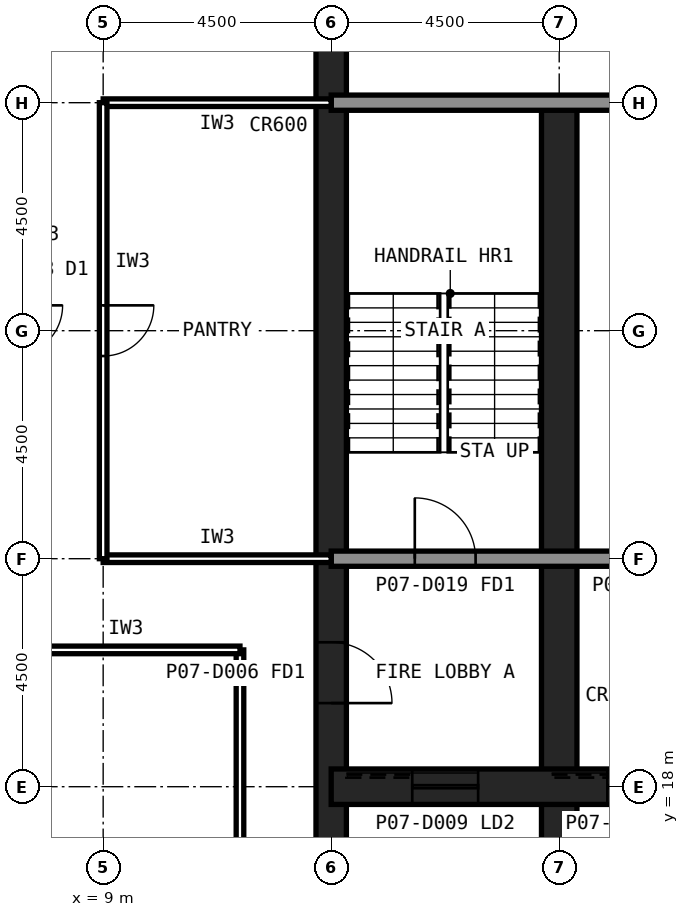
"""IFC4 building model, lengths in metres.
Left out: names, types, materials, properties, quantities, classifications, styles, units other than length and angle.
Written with IfcOpenShell. Run it as: python <this file> out.ifc"""

import sys

from ifc_helpers import new_model, si_unit, direction, frame, frame_2d, origin, place, context, subcontext, project, spatial, rectangle, extrude, element, fill, save


model = new_model("IFC4")
c1 = context("Model", 3, precision=1e-05, world=origin(), true_north=direction((0.0, 1.0)))
c2 = subcontext(c1, "Body", "Model", "MODEL_VIEW")
j1 = project(units=[si_unit("LENGTHUNIT", "METRE"), si_unit("PLANEANGLEUNIT", "RADIAN")], contexts=[c1])
p1 = place(None, origin())
s1 = spatial("IfcSite", under=j1, at=p1, CompositionType="ELEMENT")
p2 = place(p1, origin())
s2 = spatial("IfcBuilding", under=s1, at=p2, CompositionType="ELEMENT")
p3 = place(p2, frame((0.0, 0.0, 33.2)))
s3 = spatial("IfcBuildingStorey", under=s2, at=p3, CompositionType="ELEMENT", Elevation=33.2)
p4 = place(p3, frame((13.5, 40.5, 0.0), z_axis=(0.0, 0.0, 1.0), x_axis=(0.0, -1.0, 0.0)))
e1 = element("IfcWall", 1, at=p4, inside=s3, PredefinedType="SHEAR", context=c2, shape_type="SweptSolid", body=[
    extrude(rectangle(XDim=27.0, YDim=0.6, at=frame_2d((13.5, 0.0))), origin(), (0.0, 0.0, 1.0), 4.2),
])
p5 = place(p4, frame((19.65, 0.0, 0.0)))
e2 = element("IfcOpeningElement", 2, at=p5, cuts=e1, PredefinedType="OPENING", context=c2, shape_type="SweptSolid", body=[
    extrude(rectangle(XDim=1.2, YDim=2.1, at=frame_2d((0.6, 1.05))), frame((0.0, 0.31, 0.0), z_axis=(0.0, -1.0, 0.0), x_axis=(1.0, 0.0, 0.0)), (0.0, 0.0, 1.0), 0.62),
])
p6 = place(p4, frame((5.85, 0.0, 0.0)))
e3 = element("IfcOpeningElement", 3, at=p6, cuts=e1, PredefinedType="OPENING", context=c2, shape_type="SweptSolid", body=[
    extrude(rectangle(XDim=1.8, YDim=2.1, at=frame_2d((0.9, 1.05))), frame((0.0, 0.31, 0.0), z_axis=(0.0, -1.0, 0.0), x_axis=(1.0, 0.0, 0.0)), (0.0, 0.0, 1.0), 0.62),
])
p7 = place(p3, frame((18.0, 13.5, 0.0), z_axis=(0.0, 0.0, 1.0), x_axis=(0.0, 1.0, 0.0)))
e4 = element("IfcWall", 4, at=p7, inside=s3, PredefinedType="SHEAR", context=c2, shape_type="SweptSolid", body=[
    extrude(rectangle(XDim=18.0, YDim=0.7, at=frame_2d((9.0, 0.0))), origin(), (0.0, 0.0, 1.0), 4.2),
])
p8 = place(p3, frame((13.5, 18.0, 0.0), z_axis=(0.0, 0.0, 1.0), x_axis=(1.0, 0.0, 0.0)))
e5 = element("IfcWall", 5, at=p8, inside=s3, PredefinedType="SHEAR", context=c2, shape_type="SweptSolid", body=[
    extrude(rectangle(XDim=27.0, YDim=0.7, at=frame_2d((13.5, 0.0))), origin(), (0.0, 0.0, 1.0), 4.2),
])
p9 = place(p8, frame((24.3, 0.0, 0.0)))
e6 = element("IfcOpeningElement", 6, at=p9, cuts=e5, PredefinedType="OPENING", context=c2, shape_type="SweptSolid", body=[
    extrude(rectangle(XDim=0.9, YDim=2.1, at=frame_2d((0.45, 1.05))), frame((0.0, 0.36, 0.0), z_axis=(0.0, -1.0, 0.0), x_axis=(1.0, 0.0, 0.0)), (0.0, 0.0, 1.0), 0.72),
])
p10 = place(p8, frame((5.45, 0.0, 0.0)))
e7 = element("IfcOpeningElement", 7, at=p10, cuts=e5, PredefinedType="OPENING", context=c2, shape_type="SweptSolid", body=[
    extrude(rectangle(XDim=1.1, YDim=2.1, at=frame_2d((0.55, 1.05))), frame((0.0, 0.36, 0.0), z_axis=(0.0, -1.0, 0.0), x_axis=(1.0, 0.0, 0.0)), (0.0, 0.0, 1.0), 0.72),
])
p11 = place(p8, frame((8.45, 0.0, 0.0)))
e8 = element("IfcOpeningElement", 8, at=p11, cuts=e5, PredefinedType="OPENING", context=c2, shape_type="SweptSolid", body=[
    extrude(rectangle(XDim=1.1, YDim=2.1, at=frame_2d((0.55, 1.05))), frame((0.0, 0.36, 0.0), z_axis=(0.0, -1.0, 0.0), x_axis=(1.0, 0.0, 0.0)), (0.0, 0.0, 1.0), 0.72),
])
p12 = place(p8, frame((11.45, 0.0, 0.0)))
e9 = element("IfcOpeningElement", 9, at=p12, cuts=e5, PredefinedType="OPENING", context=c2, shape_type="SweptSolid", body=[
    extrude(rectangle(XDim=1.1, YDim=2.1, at=frame_2d((0.55, 1.05))), frame((0.0, 0.36, 0.0), z_axis=(0.0, -1.0, 0.0), x_axis=(1.0, 0.0, 0.0)), (0.0, 0.0, 1.0), 0.72),
])
p13 = place(p8, frame((14.45, 0.0, 0.0)))
e10 = element("IfcOpeningElement", 10, at=p13, cuts=e5, PredefinedType="OPENING", context=c2, shape_type="SweptSolid", body=[
    extrude(rectangle(XDim=1.1, YDim=2.1, at=frame_2d((0.55, 1.05))), frame((0.0, 0.36, 0.0), z_axis=(0.0, -1.0, 0.0), x_axis=(1.0, 0.0, 0.0)), (0.0, 0.0, 1.0), 0.72),
])
p14 = place(p8, frame((17.45, 0.0, 0.0)))
e11 = element("IfcOpeningElement", 11, at=p14, cuts=e5, PredefinedType="OPENING", context=c2, shape_type="SweptSolid", body=[
    extrude(rectangle(XDim=1.1, YDim=2.1, at=frame_2d((0.55, 1.05))), frame((0.0, 0.36, 0.0), z_axis=(0.0, -1.0, 0.0), x_axis=(1.0, 0.0, 0.0)), (0.0, 0.0, 1.0), 0.72),
])
p15 = place(p8, frame((20.45, 0.0, 0.0)))
e12 = element("IfcOpeningElement", 12, at=p15, cuts=e5, PredefinedType="OPENING", context=c2, shape_type="SweptSolid", body=[
    extrude(rectangle(XDim=1.1, YDim=2.1, at=frame_2d((0.55, 1.05))), frame((0.0, 0.36, 0.0), z_axis=(0.0, -1.0, 0.0), x_axis=(1.0, 0.0, 0.0)), (0.0, 0.0, 1.0), 0.72),
])
p16 = place(p8, frame((1.6, 0.0, 0.0)))
e13 = element("IfcOpeningElement", 13, at=p16, cuts=e5, PredefinedType="OPENING", context=c2, shape_type="SweptSolid", body=[
    extrude(rectangle(XDim=1.3, YDim=2.2, at=frame_2d((0.65, 1.1))), frame((0.0, 0.36, 0.0), z_axis=(0.0, -1.0, 0.0), x_axis=(1.0, 0.0, 0.0)), (0.0, 0.0, 1.0), 0.72),
])
p17 = place(p3, frame((13.5, 22.5, 0.0), z_axis=(0.0, 0.0, 1.0), x_axis=(1.0, 0.0, 0.0)))
e14 = element("IfcWall", 14, at=p17, inside=s3, PredefinedType="SOLIDWALL", context=c2, shape_type="SweptSolid", body=[
    extrude(rectangle(XDim=27.0, YDim=0.3, at=frame_2d((13.5, 0.0))), origin(), (0.0, 0.0, 1.0), 4.04),
])
p18 = place(p17, frame((1.65, 0.0, 0.0)))
e15 = element("IfcOpeningElement", 15, at=p18, cuts=e14, PredefinedType="OPENING", context=c2, shape_type="SweptSolid", body=[
    extrude(rectangle(XDim=1.2, YDim=2.1, at=frame_2d((0.6, 1.05))), frame((0.0, 0.16, 0.0), z_axis=(0.0, -1.0, 0.0), x_axis=(1.0, 0.0, 0.0)), (0.0, 0.0, 1.0), 0.32),
])
p19 = place(p17, frame((6.025, 0.0, 0.0)))
e16 = element("IfcOpeningElement", 16, at=p19, cuts=e14, PredefinedType="OPENING", context=c2, shape_type="SweptSolid", body=[
    extrude(rectangle(XDim=1.0, YDim=2.1, at=frame_2d((0.5, 1.05))), frame((0.0, 0.16, 0.0), z_axis=(0.0, -1.0, 0.0), x_axis=(1.0, 0.0, 0.0)), (0.0, 0.0, 1.0), 0.32),
])
p20 = place(p17, frame((10.525, 0.0, 0.0)))
e17 = element("IfcOpeningElement", 17, at=p20, cuts=e14, PredefinedType="OPENING", context=c2, shape_type="SweptSolid", body=[
    extrude(rectangle(XDim=1.0, YDim=2.1, at=frame_2d((0.5, 1.05))), frame((0.0, 0.16, 0.0), z_axis=(0.0, -1.0, 0.0), x_axis=(1.0, 0.0, 0.0)), (0.0, 0.0, 1.0), 0.32),
])
p21 = place(p17, frame((19.75, 0.0, 0.0)))
e18 = element("IfcOpeningElement", 18, at=p21, cuts=e14, PredefinedType="OPENING", context=c2, shape_type="SweptSolid", body=[
    extrude(rectangle(XDim=1.0, YDim=2.1, at=frame_2d((0.5, 1.05))), frame((0.0, 0.16, 0.0), z_axis=(0.0, -1.0, 0.0), x_axis=(1.0, 0.0, 0.0)), (0.0, 0.0, 1.0), 0.32),
])
p22 = place(p17, frame((15.05, 0.0, 0.0)))
e19 = element("IfcOpeningElement", 19, at=p22, cuts=e14, PredefinedType="OPENING", context=c2, shape_type="SweptSolid", body=[
    extrude(rectangle(XDim=1.4, YDim=2.4, at=frame_2d((0.7, 1.2))), frame((0.0, 0.16, 0.0), z_axis=(0.0, -1.0, 0.0), x_axis=(1.0, 0.0, 0.0)), (0.0, 0.0, 1.0), 0.32),
])
p23 = place(p3, frame((13.5, 31.5, 0.0), z_axis=(0.0, 0.0, 1.0), x_axis=(1.0, 0.0, 0.0)))
e20 = element("IfcWall", 20, at=p23, inside=s3, PredefinedType="SOLIDWALL", context=c2, shape_type="SweptSolid", body=[
    extrude(rectangle(XDim=27.0, YDim=0.3, at=frame_2d((13.5, 0.0))), origin(), (0.0, 0.0, 1.0), 4.04),
])
p24 = place(p23, frame((24.15, 0.0, 0.0)))
e21 = element("IfcOpeningElement", 21, at=p24, cuts=e20, PredefinedType="OPENING", context=c2, shape_type="SweptSolid", body=[
    extrude(rectangle(XDim=1.2, YDim=2.1, at=frame_2d((0.6, 1.05))), frame((0.0, 0.16, 0.0), z_axis=(0.0, -1.0, 0.0), x_axis=(1.0, 0.0, 0.0)), (0.0, 0.0, 1.0), 0.32),
])
p25 = place(p23, frame((15.3, 0.0, 0.0)))
e22 = element("IfcOpeningElement", 22, at=p25, cuts=e20, PredefinedType="OPENING", context=c2, shape_type="SweptSolid", body=[
    extrude(rectangle(XDim=0.9, YDim=2.1, at=frame_2d((0.45, 1.05))), frame((0.0, 0.16, 0.0), z_axis=(0.0, -1.0, 0.0), x_axis=(1.0, 0.0, 0.0)), (0.0, 0.0, 1.0), 0.32),
])
p26 = place(p23, frame((19.8, 0.0, 0.0)))
e23 = element("IfcOpeningElement", 23, at=p26, cuts=e20, PredefinedType="OPENING", context=c2, shape_type="SweptSolid", body=[
    extrude(rectangle(XDim=0.9, YDim=2.1, at=frame_2d((0.45, 1.05))), frame((0.0, 0.16, 0.0), z_axis=(0.0, -1.0, 0.0), x_axis=(1.0, 0.0, 0.0)), (0.0, 0.0, 1.0), 0.32),
])
p27 = place(p3, frame((11.7, 20.7, 0.0), z_axis=(0.0, 0.0, 1.0), x_axis=(0.0, -1.0, 0.0)))
e24 = element("IfcWall", 24, at=p27, inside=s3, PredefinedType="PARTITIONING", context=c2, shape_type="SweptSolid", body=[
    extrude(rectangle(XDim=9.0, YDim=0.15, at=frame_2d((4.5, 0.0))), origin(), (0.0, 0.0, 1.0), 4.04),
])
p28 = place(p3, frame((7.2, 20.7, 0.0), z_axis=(0.0, 0.0, 1.0), x_axis=(1.0, 0.0, 0.0)))
e25 = element("IfcWall", 25, at=p28, inside=s3, PredefinedType="PARTITIONING", context=c2, shape_type="SweptSolid", body=[
    extrude(rectangle(XDim=4.5, YDim=0.15, at=frame_2d((2.25, 0.0))), origin(), (0.0, 0.0, 1.0), 4.04),
])
for number, where, z_axis, x_axis in (
    (26, (9.0, 22.5, 0.0), (0.0, 0.0, 1.0), (1.0, 0.0, 0.0)),
    (27, (13.5, 31.5, 0.0), (0.0, 0.0, 1.0), (-1.0, 0.0, 0.0)),
):
    element("IfcWall", number, at=place(p3, frame(where, z_axis=z_axis, x_axis=x_axis)), inside=s3, PredefinedType="PARTITIONING", context=c2, shape_type="SweptSolid", body=[
        extrude(rectangle(XDim=4.5, YDim=0.15, at=frame_2d((2.25, 0.0))), origin(), (0.0, 0.0, 1.0), 3.189),
    ])
p29 = place(p3, frame((9.0, 31.5, 0.0), z_axis=(0.0, 0.0, 1.0), x_axis=(0.0, -1.0, 0.0)))
e28 = element("IfcWall", 28, at=p29, inside=s3, PredefinedType="PARTITIONING", context=c2, shape_type="SweptSolid", body=[
    extrude(rectangle(XDim=9.0, YDim=0.15, at=frame_2d((4.5, 0.0))), origin(), (0.0, 0.0, 1.0), 4.04),
])
p30 = place(p29, frame((4.0, 0.0, 0.0)))
e29 = element("IfcOpeningElement", 29, at=p30, cuts=e28, PredefinedType="OPENING", context=c2, shape_type="SweptSolid", body=[
    extrude(rectangle(XDim=1.0, YDim=2.1, at=frame_2d((0.5, 1.05))), frame((0.0, 0.085, 0.0), z_axis=(0.0, -1.0, 0.0), x_axis=(1.0, 0.0, 0.0)), (0.0, 0.0, 1.0), 0.17),
])
p31 = place(p5, origin())
e30 = element("IfcDoor", 30, at=p31, inside=s3, OperationType="SINGLE_SWING_RIGHT", PredefinedType="DOOR", context=c2, shape_type="SweptSolid", body=[
    extrude(rectangle(XDim=1.2, YDim=2.1, at=frame_2d((0.6, 1.05))), frame((0.0, 0.025, 0.0), z_axis=(0.0, -1.0, 0.0), x_axis=(1.0, 0.0, 0.0)), (0.0, 0.0, 1.0), 0.05),
])
fill(e2, e30)
p32 = place(p18, origin())
e31 = element("IfcDoor", 31, at=p32, inside=s3, OperationType="SINGLE_SWING_LEFT", PredefinedType="DOOR", context=c2, shape_type="SweptSolid", body=[
    extrude(rectangle(XDim=1.2, YDim=2.1, at=frame_2d((0.6, 1.05))), frame((0.0, 0.025, 0.0), z_axis=(0.0, -1.0, 0.0), x_axis=(1.0, 0.0, 0.0)), (0.0, 0.0, 1.0), 0.05),
])
fill(e15, e31)
p33 = place(p10, origin())
e32 = element("IfcDoor", 32, at=p33, inside=s3, OperationType="SLIDING_TO_LEFT", PredefinedType="DOOR", context=c2, shape_type="SweptSolid", body=[
    extrude(rectangle(XDim=1.1, YDim=2.1, at=frame_2d((0.55, 1.05))), frame((0.0, 0.025, 0.0), z_axis=(0.0, -1.0, 0.0), x_axis=(1.0, 0.0, 0.0)), (0.0, 0.0, 1.0), 0.05),
])
fill(e7, e32)
p34 = place(p16, origin())
e33 = element("IfcDoor", 33, at=p34, inside=s3, OperationType="SLIDING_TO_LEFT", PredefinedType="DOOR", context=c2, shape_type="SweptSolid", body=[
    extrude(rectangle(XDim=1.3, YDim=2.2, at=frame_2d((0.65, 1.1))), frame((0.0, 0.025, 0.0), z_axis=(0.0, -1.0, 0.0), x_axis=(1.0, 0.0, 0.0)), (0.0, 0.0, 1.0), 0.05),
])
fill(e13, e33)
p35 = place(p30, origin())
e34 = element("IfcDoor", 34, at=p35, inside=s3, OperationType="SINGLE_SWING_LEFT", PredefinedType="DOOR", context=c2, shape_type="SweptSolid", body=[
    extrude(rectangle(XDim=1.0, YDim=2.1, at=frame_2d((0.5, 1.05))), frame((0.0, 0.025, 0.0), z_axis=(0.0, -1.0, 0.0), x_axis=(1.0, 0.0, 0.0)), (0.0, 0.0, 1.0), 0.05),
])
fill(e29, e34)
save(model, sys.argv[1])
